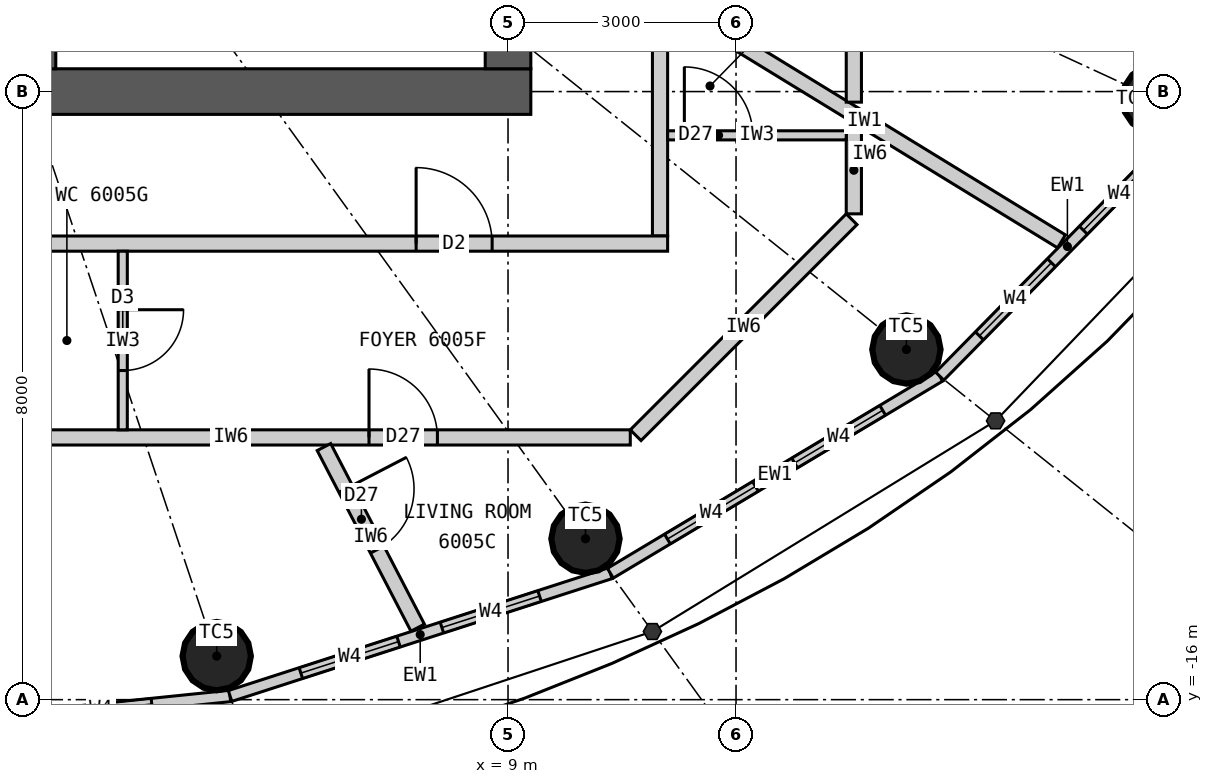
"""IFC4 building model, lengths in metres.
Left out: names, types, materials, properties, quantities, classifications, styles, units other than length and angle.
Written with IfcOpenShell. Run it as: python <this file> out.ifc"""

import sys

from ifc_helpers import new_model, si_unit, direction, frame, frame_2d, origin, origin_2d, place, context, subcontext, project, spatial, rectangle, circle, extrude, element, fill, save


model = new_model("IFC4")
c1 = context("Model", 3, precision=1e-05, world=origin(), true_north=direction((0.0, 1.0)))
c2 = subcontext(c1, "Body", "Model", "MODEL_VIEW")
j1 = project(units=[si_unit("LENGTHUNIT", "METRE"), si_unit("PLANEANGLEUNIT", "RADIAN")], contexts=[c1])
p1 = place(None, origin())
s1 = spatial("IfcSite", under=j1, at=p1, CompositionType="ELEMENT")
p2 = place(p1, origin())
s2 = spatial("IfcBuilding", under=s1, at=p2, CompositionType="ELEMENT")
p3 = place(p2, frame((0.0, 0.0, 222.6)))
s3 = spatial("IfcBuildingStorey", under=s2, at=p3, CompositionType="ELEMENT", Elevation=222.6)
for number, where, z_axis, x_axis in (
    (1, (5.167, -15.427, 0.0), (0.0, 0.0, 1.0), (1.0, 0.0, 0.0)),
    (2, (10.019, -13.883, 0.0), (0.0, 0.0, 1.0), (1.0, 0.0, 0.0)),
    (3, (14.241, -11.393, 0.0), (0.0, 0.0, 1.0), (1.0, 0.0, 0.0)),
    (4, (17.532, -8.098, 0.0), (0.0, 0.0, 1.0), (1.0, 0.0, 0.0)),
):
    element("IfcColumn", number, at=place(p3, frame(where, z_axis=z_axis, x_axis=x_axis)), inside=s3, PredefinedType="COLUMN", context=c2, shape_type="SweptSolid", body=[
        extrude(circle(Radius=0.45, at=origin_2d()), origin(), (0.0, 0.0, 1.0), 3.3),
    ])
p4 = place(p3, frame((9.3, -8.0, 0.0), z_axis=(0.0, 0.0, 1.0), x_axis=(-1.0, 0.0, 0.0)))
e5 = element("IfcWall", 5, at=p4, inside=s3, PredefinedType="SHEAR", context=c2, shape_type="SweptSolid", body=[
    extrude(rectangle(XDim=18.6, YDim=0.6, at=frame_2d((9.3, 0.0))), origin(), (0.0, 0.0, 1.0), 3.3),
])
p5 = place(p4, frame((8.0, 0.0, 0.0)))
e6 = element("IfcOpeningElement", 6, at=p5, cuts=e5, PredefinedType="OPENING", context=c2, shape_type="SweptSolid", body=[
    extrude(rectangle(XDim=1.2, YDim=2.2, at=frame_2d((0.6, 1.1))), frame((0.0, 0.31, 0.0), z_axis=(0.0, -1.0, 0.0), x_axis=(1.0, 0.0, 0.0)), (0.0, 0.0, 1.0), 0.62),
])
p6 = place(p4, frame((15.6, 0.0, 0.0)))
e7 = element("IfcOpeningElement", 7, at=p6, cuts=e5, PredefinedType="OPENING", context=c2, shape_type="SweptSolid", body=[
    extrude(rectangle(XDim=0.9, YDim=2.2, at=frame_2d((0.45, 1.1))), frame((0.0, 0.31, 0.0), z_axis=(0.0, -1.0, 0.0), x_axis=(1.0, 0.0, 0.0)), (0.0, 0.0, 1.0), 0.62),
])
p7 = place(p3, frame((9.0, -7.7, 0.0), z_axis=(0.0, 0.0, 1.0), x_axis=(0.0, 1.0, 0.0)))
e8 = element("IfcWall", 8, at=p7, inside=s3, PredefinedType="SHEAR", context=c2, shape_type="SweptSolid", body=[
    extrude(rectangle(XDim=15.4, YDim=0.6, at=frame_2d((7.7, 0.0))), origin(), (0.0, 0.0, 1.0), 3.3),
])
p8 = place(p7, frame((6.8, 0.0, 0.0)))
e9 = element("IfcOpeningElement", 9, at=p8, cuts=e8, PredefinedType="OPENING", context=c2, shape_type="SweptSolid", body=[
    extrude(rectangle(XDim=1.8, YDim=2.2, at=frame_2d((0.9, 1.1))), frame((0.0, 0.31, 0.0), z_axis=(0.0, -1.0, 0.0), x_axis=(1.0, 0.0, 0.0)), (0.0, 0.0, 1.0), 0.62),
])
p9 = place(p3, frame((2.75, -7.7, 0.0), z_axis=(0.0, 0.0, 1.0), x_axis=(0.0, 1.0, 0.0)))
e10 = element("IfcWall", 10, at=p9, inside=s3, PredefinedType="SHEAR", context=c2, shape_type="SweptSolid", body=[
    extrude(rectangle(XDim=3.2, YDim=0.6, at=frame_2d((1.6, 0.0))), origin(), (0.0, 0.0, 1.0), 3.3),
])
p10 = place(p9, frame((1.175, 0.0, 0.0)))
e11 = element("IfcOpeningElement", 11, at=p10, cuts=e10, PredefinedType="OPENING", context=c2, shape_type="SweptSolid", body=[
    extrude(rectangle(XDim=1.1, YDim=2.2, at=frame_2d((0.55, 1.1))), frame((0.0, 0.31, 0.0), z_axis=(0.0, -1.0, 0.0), x_axis=(1.0, 0.0, 0.0)), (0.0, 0.0, 1.0), 0.62),
])
p11 = place(p3, frame((0.0, -16.5, 0.0), z_axis=(0.0, 0.0, 1.0), x_axis=(0.994774574972, 0.102095763818, 0.0)))
e12 = element("IfcWall", 12, at=p11, inside=s3, PredefinedType="ELEMENTEDWALL", context=c2, shape_type="SweptSolid", body=[
    extrude(rectangle(XDim=5.371, YDim=0.15, at=frame_2d((2.686, 0.0))), origin(), (0.0, 0.0, 1.0), 3.12),
])
p12 = place(p11, frame((1.035, 0.0, 0.9)))
e13 = element("IfcOpeningElement", 13, at=p12, cuts=e12, PredefinedType="OPENING", context=c2, shape_type="SweptSolid", body=[
    extrude(rectangle(XDim=1.35, YDim=1.9, at=frame_2d((0.675, 0.95))), frame((0.0, 0.085, 0.0), z_axis=(0.0, -1.0, 0.0), x_axis=(1.0, 0.0, 0.0)), (0.0, 0.0, 1.0), 0.17),
])
p13 = place(p11, frame((2.985, 0.0, 0.9)))
e14 = element("IfcOpeningElement", 14, at=p13, cuts=e12, PredefinedType="OPENING", context=c2, shape_type="SweptSolid", body=[
    extrude(rectangle(XDim=1.35, YDim=1.9, at=frame_2d((0.675, 0.95))), frame((0.0, 0.085, 0.0), z_axis=(0.0, -1.0, 0.0), x_axis=(1.0, 0.0, 0.0)), (0.0, 0.0, 1.0), 0.17),
])
p14 = place(p3, frame((5.343, -15.952, 0.0), z_axis=(0.0, 0.0, 1.0), x_axis=(0.951644702515, 0.307200846638, 0.0)))
e15 = element("IfcWall", 15, at=p14, inside=s3, PredefinedType="ELEMENTEDWALL", context=c2, shape_type="SweptSolid", body=[
    extrude(rectangle(XDim=5.258, YDim=0.15, at=frame_2d((2.629, 0.0))), origin(), (0.0, 0.0, 1.0), 3.12),
])
p15 = place(p14, frame((0.979, 0.0, 0.9)))
e16 = element("IfcOpeningElement", 16, at=p15, cuts=e15, PredefinedType="OPENING", context=c2, shape_type="SweptSolid", body=[
    extrude(rectangle(XDim=1.35, YDim=1.9, at=frame_2d((0.675, 0.95))), frame((0.0, 0.085, 0.0), z_axis=(0.0, -1.0, 0.0), x_axis=(1.0, 0.0, 0.0)), (0.0, 0.0, 1.0), 0.17),
])
p16 = place(p14, frame((2.929, 0.0, 0.9)))
e17 = element("IfcOpeningElement", 17, at=p16, cuts=e15, PredefinedType="OPENING", context=c2, shape_type="SweptSolid", body=[
    extrude(rectangle(XDim=1.35, YDim=1.9, at=frame_2d((0.675, 0.95))), frame((0.0, 0.085, 0.0), z_axis=(0.0, -1.0, 0.0), x_axis=(1.0, 0.0, 0.0)), (0.0, 0.0, 1.0), 0.17),
])
p17 = place(p3, frame((10.346, -14.336, 0.0), z_axis=(0.0, 0.0, 1.0), x_axis=(0.85822150553, 0.513279502265, 0.0)))
e18 = element("IfcWall", 18, at=p17, inside=s3, PredefinedType="ELEMENTEDWALL", context=c2, shape_type="SweptSolid", body=[
    extrude(rectangle(XDim=5.05, YDim=0.15, at=frame_2d((2.525, 0.0))), origin(), (0.0, 0.0, 1.0), 3.12),
])
p18 = place(p17, frame((0.875, 0.0, 0.9)))
e19 = element("IfcOpeningElement", 19, at=p18, cuts=e18, PredefinedType="OPENING", context=c2, shape_type="SweptSolid", body=[
    extrude(rectangle(XDim=1.35, YDim=1.9, at=frame_2d((0.675, 0.95))), frame((0.0, 0.085, 0.0), z_axis=(0.0, -1.0, 0.0), x_axis=(1.0, 0.0, 0.0)), (0.0, 0.0, 1.0), 0.17),
])
p19 = place(p17, frame((2.825, 0.0, 0.9)))
e20 = element("IfcOpeningElement", 20, at=p19, cuts=e18, PredefinedType="OPENING", context=c2, shape_type="SweptSolid", body=[
    extrude(rectangle(XDim=1.35, YDim=1.9, at=frame_2d((0.675, 0.95))), frame((0.0, 0.085, 0.0), z_axis=(0.0, -1.0, 0.0), x_axis=(1.0, 0.0, 0.0)), (0.0, 0.0, 1.0), 0.17),
])
p20 = place(p3, frame((14.68, -11.744, 0.0), z_axis=(0.0, 0.0, 1.0), x_axis=(0.701527379618, 0.712642501993, 0.0)))
e21 = element("IfcWall", 21, at=p20, inside=s3, PredefinedType="ELEMENTEDWALL", context=c2, shape_type="SweptSolid", body=[
    extrude(rectangle(XDim=4.788, YDim=0.15, at=frame_2d((2.394, 0.0))), origin(), (0.0, 0.0, 1.0), 3.12),
])
p21 = place(p20, frame((0.744, 0.0, 0.9)))
e22 = element("IfcOpeningElement", 22, at=p21, cuts=e21, PredefinedType="OPENING", context=c2, shape_type="SweptSolid", body=[
    extrude(rectangle(XDim=1.35, YDim=1.9, at=frame_2d((0.675, 0.95))), frame((0.0, 0.085, 0.0), z_axis=(0.0, -1.0, 0.0), x_axis=(1.0, 0.0, 0.0)), (0.0, 0.0, 1.0), 0.17),
])
p22 = place(p20, frame((2.694, 0.0, 0.9)))
e23 = element("IfcOpeningElement", 23, at=p22, cuts=e21, PredefinedType="OPENING", context=c2, shape_type="SweptSolid", body=[
    extrude(rectangle(XDim=1.35, YDim=1.9, at=frame_2d((0.675, 0.95))), frame((0.0, 0.085, 0.0), z_axis=(0.0, -1.0, 0.0), x_axis=(1.0, 0.0, 0.0)), (0.0, 0.0, 1.0), 0.17),
])
p23 = place(p3, frame((11.0, -9.9, 0.0), z_axis=(0.0, 0.0, 1.0), x_axis=(0.0, 1.0, 0.0)))
e24 = element("IfcWall", 24, at=p23, inside=s3, PredefinedType="PARTITIONING", context=c2, shape_type="SweptSolid", body=[
    extrude(rectangle(XDim=7.416, YDim=0.2, at=frame_2d((3.708, 0.0))), origin(), (0.0, 0.0, 1.0), 3.12),
])
p24 = place(p3, frame((11.1, -10.0, 0.0), z_axis=(0.0, 0.0, 1.0), x_axis=(-1.0, 0.0, 0.0)))
e25 = element("IfcWall", 25, at=p24, inside=s3, PredefinedType="PARTITIONING", context=c2, shape_type="SweptSolid", body=[
    extrude(rectangle(XDim=22.2, YDim=0.2, at=frame_2d((11.1, 0.0))), origin(), (0.0, 0.0, 1.0), 3.12),
])
p25 = place(p24, frame((18.864, 0.0, 0.0)))
e26 = element("IfcOpeningElement", 26, at=p25, cuts=e25, PredefinedType="OPENING", context=c2, shape_type="SweptSolid", body=[
    extrude(rectangle(XDim=1.0, YDim=2.2, at=frame_2d((0.5, 1.1))), frame((0.0, 0.11, 0.0), z_axis=(0.0, -1.0, 0.0), x_axis=(1.0, 0.0, 0.0)), (0.0, 0.0, 1.0), 0.22),
])
p26 = place(p24, frame((2.309, 0.0, 0.0)))
e27 = element("IfcOpeningElement", 27, at=p26, cuts=e25, PredefinedType="OPENING", context=c2, shape_type="SweptSolid", body=[
    extrude(rectangle(XDim=1.0, YDim=2.2, at=frame_2d((0.5, 1.1))), frame((0.0, 0.11, 0.0), z_axis=(0.0, -1.0, 0.0), x_axis=(1.0, 0.0, 0.0)), (0.0, 0.0, 1.0), 0.22),
])
p27 = place(p3, frame((11.1, -6.797, 0.0), z_axis=(0.0, 0.0, 1.0), x_axis=(0.852799818179, -0.522237943963, 0.0)))
e28 = element("IfcWall", 28, at=p27, inside=s3, PredefinedType="PARTITIONING", context=c2, shape_type="SweptSolid", body=[
    extrude(rectangle(XDim=6.077, YDim=0.2, at=frame_2d((3.039, 0.0))), origin(), (0.0, 0.0, 1.0), 3.12),
])
p28 = place(p3, frame((0.101, -12.55, 0.0), z_axis=(0.0, 0.0, 1.0), x_axis=(1.0, 0.0, 0.0)))
e29 = element("IfcWall", 29, at=p28, inside=s3, PredefinedType="PARTITIONING", context=c2, shape_type="SweptSolid", body=[
    extrude(rectangle(XDim=10.508, YDim=0.2, at=frame_2d((5.254, 0.0))), origin(), (0.0, 0.0, 1.0), 3.12),
])
p29 = place(p28, frame((1.4, 0.0, 0.0)))
e30 = element("IfcOpeningElement", 30, at=p29, cuts=e29, PredefinedType="OPENING", context=c2, shape_type="SweptSolid", body=[
    extrude(rectangle(XDim=0.8, YDim=2.1, at=frame_2d((0.4, 1.05))), frame((0.0, 0.11, 0.0), z_axis=(0.0, -1.0, 0.0), x_axis=(1.0, 0.0, 0.0)), (0.0, 0.0, 1.0), 0.22),
])
p30 = place(p28, frame((7.07, 0.0, 0.0)))
e31 = element("IfcOpeningElement", 31, at=p30, cuts=e29, PredefinedType="OPENING", context=c2, shape_type="SweptSolid", body=[
    extrude(rectangle(XDim=0.9, YDim=2.1, at=frame_2d((0.45, 1.05))), frame((0.0, 0.11, 0.0), z_axis=(0.0, -1.0, 0.0), x_axis=(1.0, 0.0, 0.0)), (0.0, 0.0, 1.0), 0.22),
])
p31 = place(p3, frame((10.679, -12.521, 0.0), z_axis=(0.0, 0.0, 1.0), x_axis=(0.707106781187, 0.707106781187, 0.0)))
e32 = element("IfcWall", 32, at=p31, inside=s3, PredefinedType="PARTITIONING", context=c2, shape_type="SweptSolid", body=[
    extrude(rectangle(XDim=4.019, YDim=0.2, at=frame_2d((2.009, 0.0))), origin(), (0.0, 0.0, 1.0), 3.12),
])
p32 = place(p3, frame((13.55, -9.609, 0.0), z_axis=(0.0, 0.0, 1.0), x_axis=(0.0, 1.0, 0.0)))
e33 = element("IfcWall", 33, at=p32, inside=s3, PredefinedType="PARTITIONING", context=c2, shape_type="SweptSolid", body=[
    extrude(rectangle(XDim=1.148, YDim=0.2, at=frame_2d((0.574, 0.0))), origin(), (0.0, 0.0, 1.0), 3.12),
])
p33 = place(p3, frame((6.578, -12.677, 0.0), z_axis=(0.0, 0.0, 1.0), x_axis=(0.460620531465, -0.887597164255, 0.0)))
e34 = element("IfcWall", 34, at=p33, inside=s3, PredefinedType="PARTITIONING", context=c2, shape_type="SweptSolid", body=[
    extrude(rectangle(XDim=2.678, YDim=0.2, at=frame_2d((1.339, 0.0))), origin(), (0.0, 0.0, 1.0), 3.12),
])
p34 = place(p33, frame((0.62, 0.0, 0.0)))
e35 = element("IfcOpeningElement", 35, at=p34, cuts=e34, PredefinedType="OPENING", context=c2, shape_type="SweptSolid", body=[
    extrude(rectangle(XDim=0.9, YDim=2.1, at=frame_2d((0.45, 1.05))), frame((0.0, 0.11, 0.0), z_axis=(0.0, -1.0, 0.0), x_axis=(1.0, 0.0, 0.0)), (0.0, 0.0, 1.0), 0.22),
])
p35 = place(p3, frame((3.931, -10.1, 0.0), z_axis=(0.0, 0.0, 1.0), x_axis=(0.0, -1.0, 0.0)))
e36 = element("IfcWall", 36, at=p35, inside=s3, PredefinedType="PARTITIONING", context=c2, shape_type="SweptSolid", body=[
    extrude(rectangle(XDim=2.35, YDim=0.12, at=frame_2d((1.175, 0.0))), origin(), (0.0, 0.0, 1.0), 3.12),
])
p36 = place(p35, frame((0.77, 0.0, 0.0)))
e37 = element("IfcOpeningElement", 37, at=p36, cuts=e36, PredefinedType="OPENING", context=c2, shape_type="SweptSolid", body=[
    extrude(rectangle(XDim=0.8, YDim=2.1, at=frame_2d((0.4, 1.05))), frame((0.0, 0.07, 0.0), z_axis=(0.0, -1.0, 0.0), x_axis=(1.0, 0.0, 0.0)), (0.0, 0.0, 1.0), 0.14),
])
p37 = place(p3, frame((11.1, -8.576, 0.0), z_axis=(0.0, 0.0, 1.0), x_axis=(1.0, 0.0, 0.0)))
e38 = element("IfcWall", 38, at=p37, inside=s3, PredefinedType="PARTITIONING", context=c2, shape_type="SweptSolid", body=[
    extrude(rectangle(XDim=2.35, YDim=0.12, at=frame_2d((1.175, 0.0))), origin(), (0.0, 0.0, 1.0), 3.12),
])
p38 = place(p37, frame((0.22, 0.0, 0.0)))
e39 = element("IfcOpeningElement", 39, at=p38, cuts=e38, PredefinedType="OPENING", context=c2, shape_type="SweptSolid", body=[
    extrude(rectangle(XDim=0.9, YDim=2.1, at=frame_2d((0.45, 1.05))), frame((0.0, 0.07, 0.0), z_axis=(0.0, -1.0, 0.0), x_axis=(1.0, 0.0, 0.0)), (0.0, 0.0, 1.0), 0.14),
])
p39 = place(p3, frame((13.55, -8.139, 0.0), z_axis=(0.0, 0.0, 1.0), x_axis=(0.0, 1.0, 0.0)))
e40 = element("IfcWall", 40, at=p39, inside=s3, PredefinedType="PARTITIONING", context=c2, shape_type="SweptSolid", body=[
    extrude(rectangle(XDim=12.496, YDim=0.2, at=frame_2d((6.248, 0.0))), origin(), (0.0, 0.0, 1.0), 3.12),
])
p40 = place(p39, frame((2.42, 0.0, 0.0)))
e41 = element("IfcOpeningElement", 41, at=p40, cuts=e40, PredefinedType="OPENING", context=c2, shape_type="SweptSolid", body=[
    extrude(rectangle(XDim=0.8, YDim=2.1, at=frame_2d((0.4, 1.05))), frame((0.0, 0.11, 0.0), z_axis=(0.0, -1.0, 0.0), x_axis=(1.0, 0.0, 0.0)), (0.0, 0.0, 1.0), 0.22),
])
p41 = place(p39, frame((9.776, 0.0, 0.0)))
e42 = element("IfcOpeningElement", 42, at=p41, cuts=e40, PredefinedType="OPENING", context=c2, shape_type="SweptSolid", body=[
    extrude(rectangle(XDim=0.8, YDim=2.1, at=frame_2d((0.4, 1.05))), frame((0.0, 0.11, 0.0), z_axis=(0.0, -1.0, 0.0), x_axis=(1.0, 0.0, 0.0)), (0.0, 0.0, 1.0), 0.22),
])
p42 = place(p39, frame((5.82, 0.0, 0.0)))
e43 = element("IfcOpeningElement", 43, at=p42, cuts=e40, PredefinedType="OPENING", context=c2, shape_type="SweptSolid", body=[
    extrude(rectangle(XDim=0.9, YDim=2.1, at=frame_2d((0.45, 1.05))), frame((0.0, 0.11, 0.0), z_axis=(0.0, -1.0, 0.0), x_axis=(1.0, 0.0, 0.0)), (0.0, 0.0, 1.0), 0.22),
])
p43 = place(p13, origin())
e44 = element("IfcWindow", 44, at=p43, inside=s3, PartitioningType="SINGLE_PANEL", PredefinedType="WINDOW", context=c2, shape_type="SweptSolid", body=[
    extrude(rectangle(XDim=1.35, YDim=1.9, at=frame_2d((0.675, 0.95))), frame((0.0, 0.03, 0.0), z_axis=(0.0, -1.0, 0.0), x_axis=(1.0, 0.0, 0.0)), (0.0, 0.0, 1.0), 0.06),
])
fill(e14, e44)
p44 = place(p15, origin())
e45 = element("IfcWindow", 45, at=p44, inside=s3, PartitioningType="SINGLE_PANEL", PredefinedType="WINDOW", context=c2, shape_type="SweptSolid", body=[
    extrude(rectangle(XDim=1.35, YDim=1.9, at=frame_2d((0.675, 0.95))), frame((0.0, 0.03, 0.0), z_axis=(0.0, -1.0, 0.0), x_axis=(1.0, 0.0, 0.0)), (0.0, 0.0, 1.0), 0.06),
])
fill(e16, e45)
p45 = place(p16, origin())
e46 = element("IfcWindow", 46, at=p45, inside=s3, PartitioningType="SINGLE_PANEL", PredefinedType="WINDOW", context=c2, shape_type="SweptSolid", body=[
    extrude(rectangle(XDim=1.35, YDim=1.9, at=frame_2d((0.675, 0.95))), frame((0.0, 0.03, 0.0), z_axis=(0.0, -1.0, 0.0), x_axis=(1.0, 0.0, 0.0)), (0.0, 0.0, 1.0), 0.06),
])
fill(e17, e46)
p46 = place(p18, origin())
e47 = element("IfcWindow", 47, at=p46, inside=s3, PartitioningType="SINGLE_PANEL", PredefinedType="WINDOW", context=c2, shape_type="SweptSolid", body=[
    extrude(rectangle(XDim=1.35, YDim=1.9, at=frame_2d((0.675, 0.95))), frame((0.0, 0.03, 0.0), z_axis=(0.0, -1.0, 0.0), x_axis=(1.0, 0.0, 0.0)), (0.0, 0.0, 1.0), 0.06),
])
fill(e19, e47)
p47 = place(p19, origin())
e48 = element("IfcWindow", 48, at=p47, inside=s3, PartitioningType="SINGLE_PANEL", PredefinedType="WINDOW", context=c2, shape_type="SweptSolid", body=[
    extrude(rectangle(XDim=1.35, YDim=1.9, at=frame_2d((0.675, 0.95))), frame((0.0, 0.03, 0.0), z_axis=(0.0, -1.0, 0.0), x_axis=(1.0, 0.0, 0.0)), (0.0, 0.0, 1.0), 0.06),
])
fill(e20, e48)
p48 = place(p21, origin())
e49 = element("IfcWindow", 49, at=p48, inside=s3, PartitioningType="SINGLE_PANEL", PredefinedType="WINDOW", context=c2, shape_type="SweptSolid", body=[
    extrude(rectangle(XDim=1.35, YDim=1.9, at=frame_2d((0.675, 0.95))), frame((0.0, 0.03, 0.0), z_axis=(0.0, -1.0, 0.0), x_axis=(1.0, 0.0, 0.0)), (0.0, 0.0, 1.0), 0.06),
])
fill(e22, e49)
p49 = place(p22, origin())
e50 = element("IfcWindow", 50, at=p49, inside=s3, PartitioningType="SINGLE_PANEL", PredefinedType="WINDOW", context=c2, shape_type="SweptSolid", body=[
    extrude(rectangle(XDim=1.35, YDim=1.9, at=frame_2d((0.675, 0.95))), frame((0.0, 0.03, 0.0), z_axis=(0.0, -1.0, 0.0), x_axis=(1.0, 0.0, 0.0)), (0.0, 0.0, 1.0), 0.06),
])
fill(e23, e50)
p50 = place(p26, origin())
e51 = element("IfcDoor", 51, at=p50, inside=s3, OperationType="SINGLE_SWING_RIGHT", PredefinedType="DOOR", context=c2, shape_type="SweptSolid", body=[
    extrude(rectangle(XDim=1.0, YDim=2.2, at=frame_2d((0.5, 1.1))), frame((0.0, 0.025, 0.0), z_axis=(0.0, -1.0, 0.0), x_axis=(1.0, 0.0, 0.0)), (0.0, 0.0, 1.0), 0.05),
])
fill(e27, e51)
p51 = place(p36, origin())
e52 = element("IfcDoor", 52, at=p51, inside=s3, OperationType="SINGLE_SWING_LEFT", PredefinedType="DOOR", context=c2, shape_type="SweptSolid", body=[
    extrude(rectangle(XDim=0.8, YDim=2.1, at=frame_2d((0.4, 1.05))), frame((0.0, 0.025, 0.0), z_axis=(0.0, -1.0, 0.0), x_axis=(1.0, 0.0, 0.0)), (0.0, 0.0, 1.0), 0.05),
])
fill(e37, e52)
p52 = place(p38, origin())
e53 = element("IfcDoor", 53, at=p52, inside=s3, OperationType="SINGLE_SWING_LEFT", PredefinedType="DOOR", context=c2, shape_type="SweptSolid", body=[
    extrude(rectangle(XDim=0.9, YDim=2.1, at=frame_2d((0.45, 1.05))), frame((0.0, 0.025, 0.0), z_axis=(0.0, -1.0, 0.0), x_axis=(1.0, 0.0, 0.0)), (0.0, 0.0, 1.0), 0.05),
])
fill(e39, e53)
p53 = place(p30, origin())
e54 = element("IfcDoor", 54, at=p53, inside=s3, OperationType="SINGLE_SWING_LEFT", PredefinedType="DOOR", context=c2, shape_type="SweptSolid", body=[
    extrude(rectangle(XDim=0.9, YDim=2.1, at=frame_2d((0.45, 1.05))), frame((0.0, 0.025, 0.0), z_axis=(0.0, -1.0, 0.0), x_axis=(1.0, 0.0, 0.0)), (0.0, 0.0, 1.0), 0.05),
])
fill(e31, e54)
p54 = place(p34, origin())
e55 = element("IfcDoor", 55, at=p54, inside=s3, OperationType="SINGLE_SWING_LEFT", PredefinedType="DOOR", context=c2, shape_type="SweptSolid", body=[
    extrude(rectangle(XDim=0.9, YDim=2.1, at=frame_2d((0.45, 1.05))), frame((0.0, 0.025, 0.0), z_axis=(0.0, -1.0, 0.0), x_axis=(1.0, 0.0, 0.0)), (0.0, 0.0, 1.0), 0.05),
])
fill(e35, e55)
save(model, sys.argv[1])
